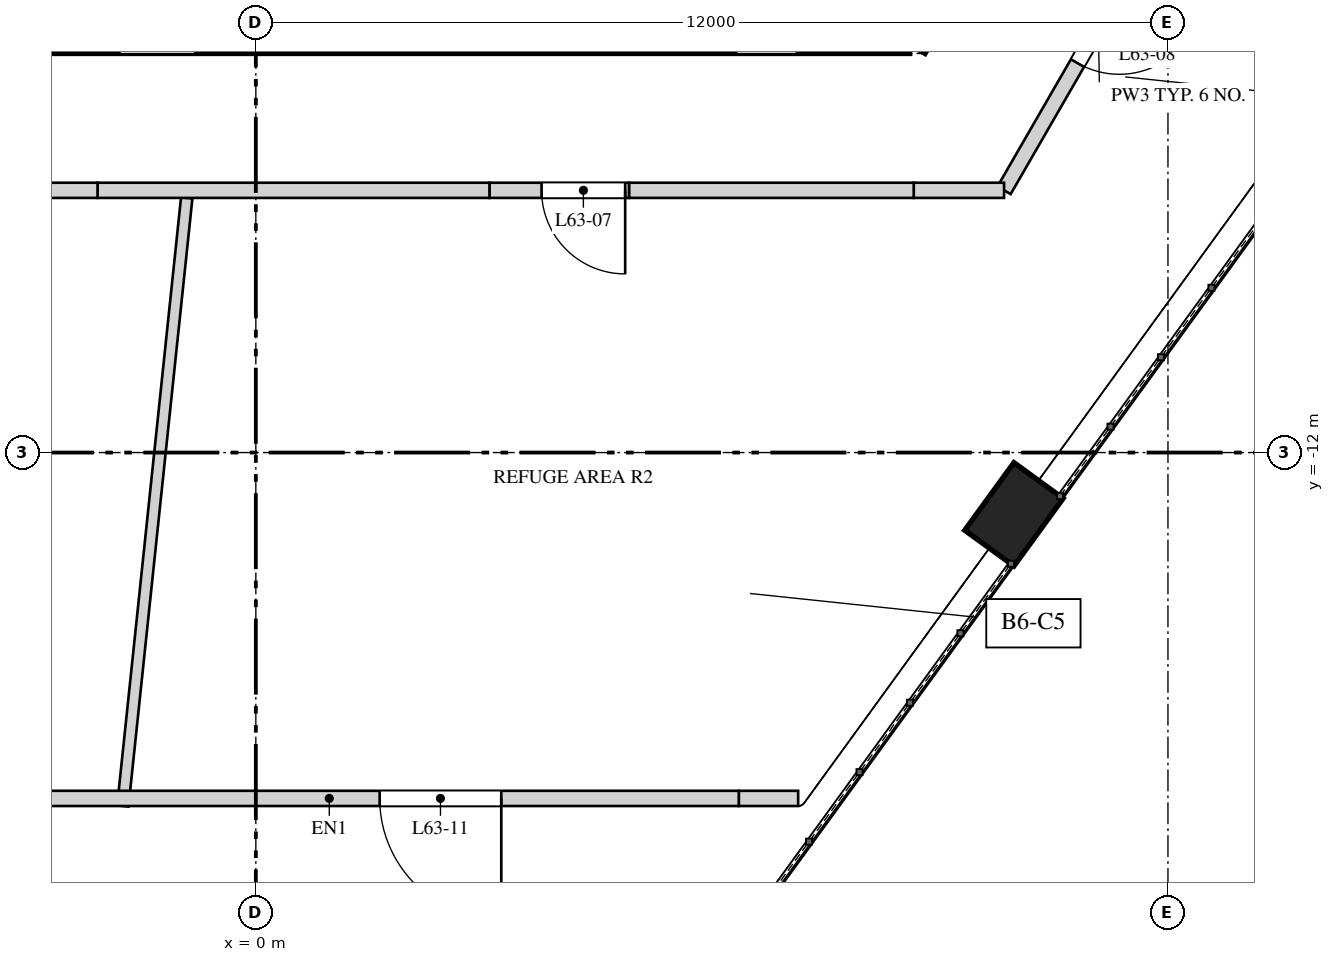
"""IFC4 building model, lengths in metres.
Left out: names, types, materials, properties, quantities, classifications, styles, units other than length and angle.
Written with IfcOpenShell. Run it as: python <this file> out.ifc"""

import sys

from ifc_helpers import new_model, si_unit, direction, frame, frame_2d, origin, origin_2d, place, context, subcontext, project, spatial, polyline, rectangle, outline, extrude, element, fill, save


model = new_model("IFC4")
c1 = context("Model", 3, precision=1e-05, world=origin(), true_north=direction((0.0, 1.0)))
c2 = subcontext(c1, "Body", "Model", "MODEL_VIEW")
j1 = project(units=[si_unit("LENGTHUNIT", "METRE"), si_unit("PLANEANGLEUNIT", "RADIAN")], contexts=[c1])
p1 = place(None, origin())
s1 = spatial("IfcSite", under=j1, at=p1, CompositionType="ELEMENT")
p2 = place(p1, origin())
s2 = spatial("IfcBuilding", under=s1, at=p2, CompositionType="ELEMENT")
p3 = place(p2, frame((0.0, 0.0, 269.2)))
s3 = spatial("IfcBuildingStorey", under=s2, at=p3, CompositionType="ELEMENT", Elevation=269.2)
p4 = place(p3, frame((-8.603, -6.4, 0.0), z_axis=(0.0, 0.0, 1.0), x_axis=(1.0, 0.0, 0.0)))
e1 = element("IfcWall", 1, at=p4, inside=s3, PredefinedType="SHEAR", context=c2, shape_type="SweptSolid", body=[
    extrude(rectangle(XDim=17.205, YDim=0.7, at=frame_2d((8.603, 0.0))), origin(), (0.0, 0.0, 1.0), 5.2),
])
p5 = place(p4, frame((6.808, 0.0, 0.0)))
e2 = element("IfcOpeningElement", 2, at=p5, cuts=e1, PredefinedType="OPENING", context=c2, shape_type="SweptSolid", body=[
    extrude(rectangle(XDim=1.0, YDim=2.4, at=frame_2d((0.5, 1.2))), frame((0.0, 0.36, 0.0), z_axis=(0.0, -1.0, 0.0), x_axis=(1.0, 0.0, 0.0)), (0.0, 0.0, 1.0), 0.72),
])
p6 = place(p4, frame((14.922, 0.0, 0.0)))
e3 = element("IfcOpeningElement", 3, at=p6, cuts=e1, PredefinedType="OPENING", context=c2, shape_type="SweptSolid", body=[
    extrude(rectangle(XDim=0.8, YDim=2.1, at=frame_2d((0.4, 1.05))), frame((0.0, 0.36, 0.0), z_axis=(0.0, -1.0, 0.0), x_axis=(1.0, 0.0, 0.0)), (0.0, 0.0, 1.0), 0.72),
])
p7 = place(p3, frame((8.501, -6.575, 0.0), z_axis=(0.0, 0.0, 1.0), x_axis=(0.499995765644, 0.866027848477, 0.0)))
e4 = element("IfcWall", 4, at=p7, inside=s3, PredefinedType="SHEAR", context=c2, shape_type="SweptSolid", body=[
    extrude(rectangle(XDim=2.887, YDim=0.7, at=frame_2d((1.443, 0.0))), origin(), (0.0, 0.0, 1.0), 5.2),
])
p8 = place(p3, frame((9.974, -12.813, 0.0), z_axis=(0.0, 0.0, 1.0), x_axis=(0.587785252292, 0.809016994375, 0.0)))
e5 = element("IfcColumn", 5, at=p8, inside=s3, PredefinedType="COLUMN", context=c2, shape_type="SweptSolid", body=[
    extrude(rectangle(XDim=1.1, YDim=0.8, at=origin_2d()), origin(), (0.0, 0.0, 1.0), 2.787),
])
p9 = place(p3, frame((-0.909, -8.65, 0.0), z_axis=(0.0, 0.0, 1.0), x_axis=(-0.104526794788, -0.994522070731, 0.0)))
e6 = element("IfcWall", 6, at=p9, inside=s3, PredefinedType="PARTITIONING", context=c2, shape_type="SweptSolid", body=[
    extrude(rectangle(XDim=8.044, YDim=0.15, at=frame_2d((4.022, 0.0))), origin(), (0.0, 0.0, 1.0), 4.85),
])
p10 = place(p3, frame((12.326, -4.25, 0.0), z_axis=(0.0, 0.0, 1.0), x_axis=(-0.50000478328, -0.866022642139, 0.0)))
e7 = element("IfcWall", 7, at=p10, inside=s3, PredefinedType="SOLIDWALL", context=c2, shape_type="SweptSolid", body=[
    extrude(rectangle(XDim=4.965, YDim=0.2, at=frame_2d((2.483, 0.0))), origin(), (0.0, 0.0, 1.0), 4.85),
])
p11 = place(p10, frame((1.933, 0.0, 0.0)))
e8 = element("IfcOpeningElement", 8, at=p11, cuts=e7, PredefinedType="OPENING", context=c2, shape_type="SweptSolid", body=[
    extrude(rectangle(XDim=1.1, YDim=2.2, at=frame_2d((0.55, 1.1))), frame((0.0, 0.11, 0.0), z_axis=(0.0, -1.0, 0.0), x_axis=(1.0, 0.0, 0.0)), (0.0, 0.0, 1.0), 0.22),
])
p12 = place(p3, frame((9.844, -8.55, 0.0), z_axis=(0.0, 0.0, 1.0), x_axis=(-1.0, 0.0, 0.0)))
e9 = element("IfcWall", 9, at=p12, inside=s3, PredefinedType="SOLIDWALL", context=c2, shape_type="SweptSolid", body=[
    extrude(rectangle(XDim=1.188, YDim=0.2, at=frame_2d((0.594, 0.0))), origin(), (0.0, 0.0, 1.0), 4.15),
])
p13 = place(p3, frame((8.655, -8.55, 0.0), z_axis=(0.0, 0.0, 1.0), x_axis=(-1.0, 0.0, 0.0)))
e10 = element("IfcWall", 10, at=p13, inside=s3, PredefinedType="SOLIDWALL", context=c2, shape_type="SweptSolid", body=[
    extrude(rectangle(XDim=3.746, YDim=0.2, at=frame_2d((1.873, 0.0))), origin(), (0.0, 0.0, 1.0), 4.85),
])
p14 = place(p3, frame((4.909, -8.55, 0.0), z_axis=(0.0, 0.0, 1.0), x_axis=(-1.0, 0.0, 0.0)))
e11 = element("IfcWall", 11, at=p14, inside=s3, PredefinedType="SOLIDWALL", context=c2, shape_type="SweptSolid", body=[
    extrude(outline(polyline([(0.0, 0.0), (1.836, 0.0), (1.836, 3.95), (0.971, 3.95), (0.971, 4.85), (0.0, 4.85), (0.0, 0.0)])), frame((0.0, 0.1, 0.0), z_axis=(0.0, -1.0, 0.0), x_axis=(1.0, 0.0, 0.0)), (0.0, 0.0, 1.0), 0.2),
])
p15 = place(p14, frame((0.05, 0.0, 0.0)))
e12 = element("IfcOpeningElement", 12, at=p15, cuts=e11, PredefinedType="OPENING", context=c2, shape_type="SweptSolid", body=[
    extrude(rectangle(XDim=1.1, YDim=2.2, at=frame_2d((0.55, 1.1))), frame((0.0, 0.11, 0.0), z_axis=(0.0, -1.0, 0.0), x_axis=(1.0, 0.0, 0.0)), (0.0, 0.0, 1.0), 0.22),
])
p16 = place(p3, frame((3.073, -8.55, 0.0), z_axis=(0.0, 0.0, 1.0), x_axis=(-1.0, 0.0, 0.0)))
e13 = element("IfcWall", 13, at=p16, inside=s3, PredefinedType="SOLIDWALL", context=c2, shape_type="SweptSolid", body=[
    extrude(rectangle(XDim=5.156, YDim=0.2, at=frame_2d((2.578, 0.0))), origin(), (0.0, 0.0, 1.0), 4.85),
])
p17 = place(p3, frame((-2.083, -8.55, 0.0), z_axis=(0.0, 0.0, 1.0), x_axis=(-1.0, 0.0, 0.0)))
e14 = element("IfcWall", 14, at=p17, inside=s3, PredefinedType="SOLIDWALL", context=c2, shape_type="SweptSolid", body=[
    extrude(rectangle(XDim=0.833, YDim=0.2, at=frame_2d((0.417, 0.0))), origin(), (0.0, 0.0, 1.0), 3.95),
])
p18 = place(p3, frame((7.135, -16.55, 0.0), z_axis=(0.0, 0.0, 1.0), x_axis=(-1.0, 0.0, 0.0)))
e15 = element("IfcWall", 15, at=p18, inside=s3, PredefinedType="SOLIDWALL", context=c2, shape_type="SweptSolid", body=[
    extrude(rectangle(XDim=0.781, YDim=0.2, at=frame_2d((0.391, 0.0))), origin(), (0.0, 0.0, 1.0), 3.95),
])
p19 = place(p3, frame((6.354, -16.55, 0.0), z_axis=(0.0, 0.0, 1.0), x_axis=(-1.0, 0.0, 0.0)))
e16 = element("IfcWall", 16, at=p19, inside=s3, PredefinedType="SOLIDWALL", context=c2, shape_type="SweptSolid", body=[
    extrude(rectangle(XDim=10.775, YDim=0.2, at=frame_2d((5.387, 0.0))), origin(), (0.0, 0.0, 1.0), 4.85),
])
p20 = place(p19, frame((3.125, 0.0, 0.0)))
e17 = element("IfcOpeningElement", 17, at=p20, cuts=e16, PredefinedType="OPENING", context=c2, shape_type="SweptSolid", body=[
    extrude(rectangle(XDim=1.6, YDim=2.3, at=frame_2d((0.8, 1.15))), frame((0.0, 0.11, 0.0), z_axis=(0.0, -1.0, 0.0), x_axis=(1.0, 0.0, 0.0)), (0.0, 0.0, 1.0), 0.22),
])
p21 = place(p15, origin())
e18 = element("IfcDoor", 18, at=p21, inside=s3, OperationType="SINGLE_SWING_LEFT", PredefinedType="DOOR", context=c2, shape_type="SweptSolid", body=[
    extrude(rectangle(XDim=1.1, YDim=2.2, at=frame_2d((0.55, 1.1))), frame((0.0, 0.025, 0.0), z_axis=(0.0, -1.0, 0.0), x_axis=(1.0, 0.0, 0.0)), (0.0, 0.0, 1.0), 0.05),
])
fill(e12, e18)
p22 = place(p11, origin())
e19 = element("IfcDoor", 19, at=p22, inside=s3, OperationType="SINGLE_SWING_RIGHT", PredefinedType="DOOR", context=c2, shape_type="SweptSolid", body=[
    extrude(rectangle(XDim=1.1, YDim=2.2, at=frame_2d((0.55, 1.1))), frame((0.0, 0.025, 0.0), z_axis=(0.0, -1.0, 0.0), x_axis=(1.0, 0.0, 0.0)), (0.0, 0.0, 1.0), 0.05),
])
fill(e8, e19)
p23 = place(p20, origin())
e20 = element("IfcDoor", 20, at=p23, inside=s3, OperationType="DOUBLE_DOOR_SINGLE_SWING", PredefinedType="DOOR", context=c2, shape_type="SweptSolid", body=[
    extrude(rectangle(XDim=1.6, YDim=2.3, at=frame_2d((0.8, 1.15))), frame((0.0, 0.025, 0.0), z_axis=(0.0, -1.0, 0.0), x_axis=(1.0, 0.0, 0.0)), (0.0, 0.0, 1.0), 0.05),
])
fill(e17, e20)
save(model, sys.argv[1])
